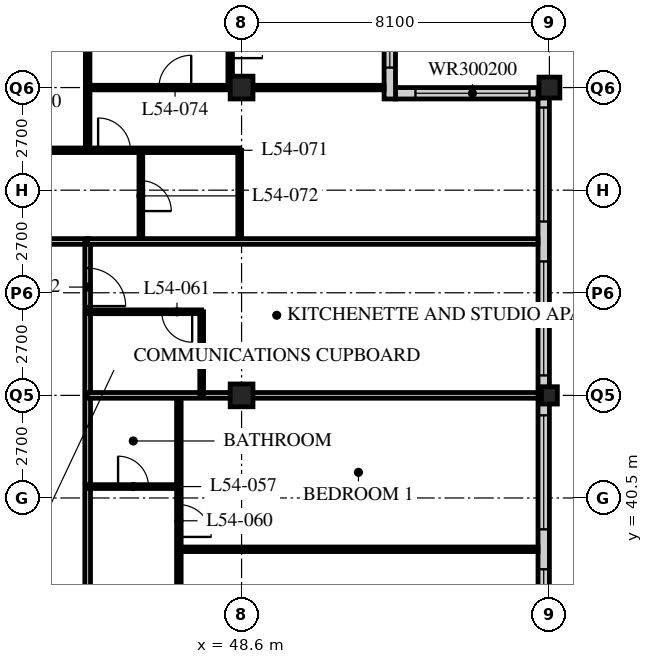
"""IFC4 building model, lengths in metres.
Left out: names, types, materials, properties, quantities, classifications, styles, units other than length and angle.
Written with IfcOpenShell. Run it as: python <this file> out.ifc"""

import sys

from ifc_helpers import new_model, si_unit, direction, frame, frame_2d, origin, origin_2d, place, context, subcontext, project, spatial, rectangle, hollow_rectangle, i_section, extrude, element, fill, save


model = new_model("IFC4")
c1 = context("Model", 3, precision=1e-05, world=origin(), true_north=direction((0.0, 1.0)))
c2 = subcontext(c1, "Body", "Model", "MODEL_VIEW")
j1 = project(units=[si_unit("LENGTHUNIT", "METRE"), si_unit("PLANEANGLEUNIT", "RADIAN")], contexts=[c1])
p1 = place(None, origin())
s1 = spatial("IfcSite", under=j1, at=p1, CompositionType="ELEMENT")
p2 = place(p1, origin())
s2 = spatial("IfcBuilding", under=s1, at=p2, CompositionType="ELEMENT")
p3 = place(p2, frame((0.0, 0.0, 210.0)))
s3 = spatial("IfcBuildingStorey", under=s2, at=p3, CompositionType="ELEMENT", Elevation=210.0)
for number, where, z_axis, x_axis in (
    (1, (48.6, 43.2, 0.0), (0.0, 0.0, 1.0), (1.0, 0.0, 0.0)),
    (2, (48.6, 51.3, 0.0), (0.0, 0.0, 1.0), (1.0, 0.0, 0.0)),
):
    element("IfcColumn", number, at=place(p3, frame(where, z_axis=z_axis, x_axis=x_axis)), inside=s3, PredefinedType="COLUMN", context=c2, shape_type="SweptSolid", body=[
        extrude(hollow_rectangle(XDim=0.6, YDim=0.6, WallThickness=0.05, at=origin_2d()), origin(), (0.0, 0.0, 1.0), 3.6),
    ])
p4 = place(p3, frame((56.7, 43.2, 0.0), z_axis=(0.0, 0.0, 1.0), x_axis=(1.0, 0.0, 0.0)))
e3 = element("IfcColumn", 3, at=p4, inside=s3, PredefinedType="COLUMN", context=c2, shape_type="SweptSolid", body=[
    extrude(i_section(OverallWidth=0.418, OverallDepth=0.456, WebThickness=0.042, FlangeThickness=0.067, FilletRadius=0.015, at=origin_2d()), origin(), (0.0, 0.0, 1.0), 3.6),
])
p5 = place(p3, frame((56.7, 51.3, 0.0), z_axis=(0.0, 0.0, 1.0), x_axis=(1.0, 0.0, 0.0)))
e4 = element("IfcColumn", 4, at=p5, inside=s3, PredefinedType="COLUMN", context=c2, shape_type="SweptSolid", body=[
    extrude(hollow_rectangle(XDim=0.55, YDim=0.55, WallThickness=0.045, at=origin_2d()), origin(), (0.0, 0.0, 1.0), 3.6),
])
p6 = place(p3, frame((56.55, 19.2, 0.0), z_axis=(0.0, 0.0, 1.0), x_axis=(0.0, 1.0, 0.0)))
e5 = element("IfcWall", 5, at=p6, inside=s3, PredefinedType="SOLIDWALL", context=c2, shape_type="SweptSolid", body=[
    extrude(rectangle(XDim=32.1, YDim=0.3, at=frame_2d((16.05, 0.0))), origin(), (0.0, 0.0, 1.0), 3.39),
])
p7 = place(p6, frame((0.225, 0.0, 0.6)))
e6 = element("IfcOpeningElement", 6, at=p7, cuts=e5, PredefinedType="OPENING", context=c2, shape_type="SweptSolid", body=[
    extrude(rectangle(XDim=3.0, YDim=2.4, at=frame_2d((1.5, 1.2))), frame((0.0, 0.16, 0.0), z_axis=(0.0, -1.0, 0.0), x_axis=(1.0, 0.0, 0.0)), (0.0, 0.0, 1.0), 0.32),
])
p8 = place(p6, frame((4.275, 0.0, 0.6)))
e7 = element("IfcOpeningElement", 7, at=p8, cuts=e5, PredefinedType="OPENING", context=c2, shape_type="SweptSolid", body=[
    extrude(rectangle(XDim=3.0, YDim=2.4, at=frame_2d((1.5, 1.2))), frame((0.0, 0.16, 0.0), z_axis=(0.0, -1.0, 0.0), x_axis=(1.0, 0.0, 0.0)), (0.0, 0.0, 1.0), 0.32),
])
p9 = place(p6, frame((8.325, 0.0, 0.6)))
e8 = element("IfcOpeningElement", 8, at=p9, cuts=e5, PredefinedType="OPENING", context=c2, shape_type="SweptSolid", body=[
    extrude(rectangle(XDim=3.0, YDim=2.4, at=frame_2d((1.5, 1.2))), frame((0.0, 0.16, 0.0), z_axis=(0.0, -1.0, 0.0), x_axis=(1.0, 0.0, 0.0)), (0.0, 0.0, 1.0), 0.32),
])
p10 = place(p6, frame((12.375, 0.0, 0.6)))
e9 = element("IfcOpeningElement", 9, at=p10, cuts=e5, PredefinedType="OPENING", context=c2, shape_type="SweptSolid", body=[
    extrude(rectangle(XDim=3.0, YDim=2.4, at=frame_2d((1.5, 1.2))), frame((0.0, 0.16, 0.0), z_axis=(0.0, -1.0, 0.0), x_axis=(1.0, 0.0, 0.0)), (0.0, 0.0, 1.0), 0.32),
])
p11 = place(p6, frame((16.425, 0.0, 0.6)))
e10 = element("IfcOpeningElement", 10, at=p11, cuts=e5, PredefinedType="OPENING", context=c2, shape_type="SweptSolid", body=[
    extrude(rectangle(XDim=3.0, YDim=2.4, at=frame_2d((1.5, 1.2))), frame((0.0, 0.16, 0.0), z_axis=(0.0, -1.0, 0.0), x_axis=(1.0, 0.0, 0.0)), (0.0, 0.0, 1.0), 0.32),
])
p12 = place(p6, frame((20.475, 0.0, 0.6)))
e11 = element("IfcOpeningElement", 11, at=p12, cuts=e5, PredefinedType="OPENING", context=c2, shape_type="SweptSolid", body=[
    extrude(rectangle(XDim=3.0, YDim=2.4, at=frame_2d((1.5, 1.2))), frame((0.0, 0.16, 0.0), z_axis=(0.0, -1.0, 0.0), x_axis=(1.0, 0.0, 0.0)), (0.0, 0.0, 1.0), 0.32),
])
p13 = place(p6, frame((24.525, 0.0, 0.6)))
e12 = element("IfcOpeningElement", 12, at=p13, cuts=e5, PredefinedType="OPENING", context=c2, shape_type="SweptSolid", body=[
    extrude(rectangle(XDim=3.0, YDim=2.4, at=frame_2d((1.5, 1.2))), frame((0.0, 0.16, 0.0), z_axis=(0.0, -1.0, 0.0), x_axis=(1.0, 0.0, 0.0)), (0.0, 0.0, 1.0), 0.32),
])
p14 = place(p6, frame((28.575, 0.0, 0.6)))
e13 = element("IfcOpeningElement", 13, at=p14, cuts=e5, PredefinedType="OPENING", context=c2, shape_type="SweptSolid", body=[
    extrude(rectangle(XDim=3.0, YDim=2.4, at=frame_2d((1.5, 1.2))), frame((0.0, 0.16, 0.0), z_axis=(0.0, -1.0, 0.0), x_axis=(1.0, 0.0, 0.0)), (0.0, 0.0, 1.0), 0.32),
])
p15 = place(p3, frame((56.4, 51.15, 0.0), z_axis=(0.0, 0.0, 1.0), x_axis=(-1.0, 0.0, 0.0)))
e14 = element("IfcWall", 14, at=p15, inside=s3, PredefinedType="SOLIDWALL", context=c2, shape_type="SweptSolid", body=[
    extrude(rectangle(XDim=3.75, YDim=0.3, at=frame_2d((1.875, 0.0))), origin(), (0.0, 0.0, 1.0), 3.39),
])
p16 = place(p15, frame((0.225, 0.0, 0.6)))
e15 = element("IfcOpeningElement", 15, at=p16, cuts=e14, PredefinedType="OPENING", context=c2, shape_type="SweptSolid", body=[
    extrude(rectangle(XDim=3.0, YDim=2.0, at=frame_2d((1.5, 1.0))), frame((0.0, 0.16, 0.0), z_axis=(0.0, -1.0, 0.0), x_axis=(1.0, 0.0, 0.0)), (0.0, 0.0, 1.0), 0.32),
])
p17 = place(p3, frame((52.5, 51.0, 0.0), z_axis=(0.0, 0.0, 1.0), x_axis=(0.0, 1.0, 0.0)))
e16 = element("IfcWall", 16, at=p17, inside=s3, PredefinedType="SOLIDWALL", context=c2, shape_type="SweptSolid", body=[
    extrude(rectangle(XDim=4.35, YDim=0.3, at=frame_2d((2.175, 0.0))), origin(), (0.0, 0.0, 1.0), 3.39),
])
p18 = place(p17, frame((0.825, 0.0, 0.6)))
e17 = element("IfcOpeningElement", 17, at=p18, cuts=e16, PredefinedType="OPENING", context=c2, shape_type="SweptSolid", body=[
    extrude(rectangle(XDim=3.0, YDim=2.0, at=frame_2d((1.5, 1.0))), frame((0.0, 0.16, 0.0), z_axis=(0.0, -1.0, 0.0), x_axis=(1.0, 0.0, 0.0)), (0.0, 0.0, 1.0), 0.32),
])
p19 = place(p3, frame((8.1, 47.25, 0.0), z_axis=(0.0, 0.0, 1.0), x_axis=(1.0, 0.0, 0.0)))
e18 = element("IfcWall", 18, at=p19, inside=s3, PredefinedType="PARTITIONING", context=c2, shape_type="SweptSolid", body=[
    extrude(rectangle(XDim=36.45, YDim=0.15, at=frame_2d((18.225, 0.0))), origin(), (0.0, 0.0, 1.0), 3.39),
])
p20 = place(p19, frame((4.45, 0.0, 0.0)))
e19 = element("IfcOpeningElement", 19, at=p20, cuts=e18, PredefinedType="OPENING", context=c2, shape_type="SweptSolid", body=[
    extrude(rectangle(XDim=1.0, YDim=2.1, at=frame_2d((0.5, 1.05))), frame((0.0, 0.085, 0.0), z_axis=(0.0, -1.0, 0.0), x_axis=(1.0, 0.0, 0.0)), (0.0, 0.0, 1.0), 0.17),
])
p21 = place(p19, frame((12.55, 0.0, 0.0)))
e20 = element("IfcOpeningElement", 20, at=p21, cuts=e18, PredefinedType="OPENING", context=c2, shape_type="SweptSolid", body=[
    extrude(rectangle(XDim=1.0, YDim=2.1, at=frame_2d((0.5, 1.05))), frame((0.0, 0.085, 0.0), z_axis=(0.0, -1.0, 0.0), x_axis=(1.0, 0.0, 0.0)), (0.0, 0.0, 1.0), 0.17),
])
p22 = place(p19, frame((30.7, 0.0, 0.0)))
e21 = element("IfcOpeningElement", 21, at=p22, cuts=e18, PredefinedType="OPENING", context=c2, shape_type="SweptSolid", body=[
    extrude(rectangle(XDim=1.0, YDim=2.1, at=frame_2d((0.5, 1.05))), frame((0.0, 0.085, 0.0), z_axis=(0.0, -1.0, 0.0), x_axis=(1.0, 0.0, 0.0)), (0.0, 0.0, 1.0), 0.17),
])
p23 = place(p19, frame((33.925, 0.0, 0.0)))
e22 = element("IfcOpeningElement", 22, at=p23, cuts=e18, PredefinedType="OPENING", context=c2, shape_type="SweptSolid", body=[
    extrude(rectangle(XDim=1.0, YDim=2.1, at=frame_2d((0.5, 1.05))), frame((0.0, 0.085, 0.0), z_axis=(0.0, -1.0, 0.0), x_axis=(1.0, 0.0, 0.0)), (0.0, 0.0, 1.0), 0.17),
])
p24 = place(p19, frame((1.525, 0.0, 0.0)))
e23 = element("IfcOpeningElement", 23, at=p24, cuts=e18, PredefinedType="OPENING", context=c2, shape_type="SweptSolid", body=[
    extrude(rectangle(XDim=1.0, YDim=2.1, at=frame_2d((0.5, 1.05))), frame((0.0, 0.085, 0.0), z_axis=(0.0, -1.0, 0.0), x_axis=(1.0, 0.0, 0.0)), (0.0, 0.0, 1.0), 0.17),
])
p25 = place(p3, frame((44.55, 18.9, 0.0), z_axis=(0.0, 0.0, 1.0), x_axis=(0.0, 1.0, 0.0)))
e24 = element("IfcWall", 24, at=p25, inside=s3, PredefinedType="PARTITIONING", context=c2, shape_type="SweptSolid", body=[
    extrude(rectangle(XDim=28.35, YDim=0.15, at=frame_2d((14.175, 0.0))), origin(), (0.0, 0.0, 1.0), 3.39),
])
p26 = place(p25, frame((0.4, 0.0, 0.0)))
e25 = element("IfcOpeningElement", 25, at=p26, cuts=e24, PredefinedType="OPENING", context=c2, shape_type="SweptSolid", body=[
    extrude(rectangle(XDim=1.0, YDim=2.1, at=frame_2d((0.5, 1.05))), frame((0.0, 0.085, 0.0), z_axis=(0.0, -1.0, 0.0), x_axis=(1.0, 0.0, 0.0)), (0.0, 0.0, 1.0), 0.17),
])
p27 = place(p25, frame((12.55, 0.0, 0.0)))
e26 = element("IfcOpeningElement", 26, at=p27, cuts=e24, PredefinedType="OPENING", context=c2, shape_type="SweptSolid", body=[
    extrude(rectangle(XDim=1.0, YDim=2.1, at=frame_2d((0.5, 1.05))), frame((0.0, 0.085, 0.0), z_axis=(0.0, -1.0, 0.0), x_axis=(1.0, 0.0, 0.0)), (0.0, 0.0, 1.0), 0.17),
])
p28 = place(p25, frame((26.65, 0.0, 0.0)))
e27 = element("IfcOpeningElement", 27, at=p28, cuts=e24, PredefinedType="OPENING", context=c2, shape_type="SweptSolid", body=[
    extrude(rectangle(XDim=1.0, YDim=2.1, at=frame_2d((0.5, 1.05))), frame((0.0, 0.085, 0.0), z_axis=(0.0, -1.0, 0.0), x_axis=(1.0, 0.0, 0.0)), (0.0, 0.0, 1.0), 0.17),
])
p29 = place(p3, frame((46.95, 18.9, 0.0), z_axis=(0.0, 0.0, 1.0), x_axis=(0.0, 1.0, 0.0)))
e28 = element("IfcWall", 28, at=p29, inside=s3, PredefinedType="PARTITIONING", context=c2, shape_type="SweptSolid", body=[
    extrude(rectangle(XDim=24.3, YDim=0.12, at=frame_2d((12.15, 0.0))), origin(), (0.0, 0.0, 1.0), 3.39),
])
p30 = place(p29, frame((0.975, 0.0, 0.0)))
e29 = element("IfcOpeningElement", 29, at=p30, cuts=e28, PredefinedType="OPENING", context=c2, shape_type="SweptSolid", body=[
    extrude(rectangle(XDim=0.85, YDim=2.1, at=frame_2d((0.425, 1.05))), frame((0.0, 0.07, 0.0), z_axis=(0.0, -1.0, 0.0), x_axis=(1.0, 0.0, 0.0)), (0.0, 0.0, 1.0), 0.14),
])
p31 = place(p29, frame((8.425, 0.0, 0.0)))
e30 = element("IfcOpeningElement", 30, at=p31, cuts=e28, PredefinedType="OPENING", context=c2, shape_type="SweptSolid", body=[
    extrude(rectangle(XDim=0.85, YDim=2.1, at=frame_2d((0.425, 1.05))), frame((0.0, 0.07, 0.0), z_axis=(0.0, -1.0, 0.0), x_axis=(1.0, 0.0, 0.0)), (0.0, 0.0, 1.0), 0.14),
])
p32 = place(p29, frame((13.125, 0.0, 0.0)))
e31 = element("IfcOpeningElement", 31, at=p32, cuts=e28, PredefinedType="OPENING", context=c2, shape_type="SweptSolid", body=[
    extrude(rectangle(XDim=0.85, YDim=2.1, at=frame_2d((0.425, 1.05))), frame((0.0, 0.07, 0.0), z_axis=(0.0, -1.0, 0.0), x_axis=(1.0, 0.0, 0.0)), (0.0, 0.0, 1.0), 0.14),
])
p33 = place(p29, frame((20.575, 0.0, 0.0)))
e32 = element("IfcOpeningElement", 32, at=p33, cuts=e28, PredefinedType="OPENING", context=c2, shape_type="SweptSolid", body=[
    extrude(rectangle(XDim=0.85, YDim=2.1, at=frame_2d((0.425, 1.05))), frame((0.0, 0.07, 0.0), z_axis=(0.0, -1.0, 0.0), x_axis=(1.0, 0.0, 0.0)), (0.0, 0.0, 1.0), 0.14),
])
p34 = place(p3, frame((44.55, 40.8, 0.0), z_axis=(0.0, 0.0, 1.0), x_axis=(1.0, 0.0, 0.0)))
e33 = element("IfcWall", 33, at=p34, inside=s3, PredefinedType="PARTITIONING", context=c2, shape_type="SweptSolid", body=[
    extrude(rectangle(XDim=2.4, YDim=0.1, at=frame_2d((1.2, 0.0))), origin(), (0.0, 0.0, 1.0), 3.39),
])
p35 = place(p34, frame((0.8, 0.0, 0.0)))
e34 = element("IfcOpeningElement", 34, at=p35, cuts=e33, PredefinedType="OPENING", context=c2, shape_type="SweptSolid", body=[
    extrude(rectangle(XDim=0.8, YDim=2.1, at=frame_2d((0.4, 1.05))), frame((0.0, 0.06, 0.0), z_axis=(0.0, -1.0, 0.0), x_axis=(1.0, 0.0, 0.0)), (0.0, 0.0, 1.0), 0.12),
])
p36 = place(p3, frame((46.95, 39.15, 0.0), z_axis=(0.0, 0.0, 1.0), x_axis=(1.0, 0.0, 0.0)))
e35 = element("IfcWall", 35, at=p36, inside=s3, PredefinedType="PARTITIONING", context=c2, shape_type="SweptSolid", body=[
    extrude(rectangle(XDim=9.45, YDim=0.12, at=frame_2d((4.725, 0.0))), origin(), (0.0, 0.0, 1.0), 3.39),
])
p37 = place(p3, frame((44.55, 43.2, 0.0), z_axis=(0.0, 0.0, 1.0), x_axis=(1.0, 0.0, 0.0)))
e36 = element("IfcWall", 36, at=p37, inside=s3, PredefinedType="PARTITIONING", context=c2, shape_type="SweptSolid", body=[
    extrude(rectangle(XDim=11.85, YDim=0.15, at=frame_2d((5.925, 0.0))), origin(), (0.0, 0.0, 1.0), 2.778),
])
p38 = place(p3, frame((47.55, 43.2, 0.0), z_axis=(0.0, 0.0, 1.0), x_axis=(0.0, 1.0, 0.0)))
e37 = element("IfcWall", 37, at=p38, inside=s3, PredefinedType="PARTITIONING", context=c2, shape_type="SweptSolid", body=[
    extrude(rectangle(XDim=2.2, YDim=0.1, at=frame_2d((1.1, 0.0))), origin(), (0.0, 0.0, 1.0), 3.39),
])
p39 = place(p3, frame((44.55, 45.4, 0.0), z_axis=(0.0, 0.0, 1.0), x_axis=(1.0, 0.0, 0.0)))
e38 = element("IfcWall", 38, at=p39, inside=s3, PredefinedType="PARTITIONING", context=c2, shape_type="SweptSolid", body=[
    extrude(rectangle(XDim=3.0, YDim=0.1, at=frame_2d((1.5, 0.0))), origin(), (0.0, 0.0, 1.0), 3.39),
])
p40 = place(p39, frame((1.95, 0.0, 0.0)))
e39 = element("IfcOpeningElement", 39, at=p40, cuts=e38, PredefinedType="OPENING", context=c2, shape_type="SweptSolid", body=[
    extrude(rectangle(XDim=0.8, YDim=2.1, at=frame_2d((0.4, 1.05))), frame((0.0, 0.06, 0.0), z_axis=(0.0, -1.0, 0.0), x_axis=(1.0, 0.0, 0.0)), (0.0, 0.0, 1.0), 0.12),
])
p41 = place(p3, frame((40.5, 49.65, 0.0), z_axis=(0.0, 0.0, 1.0), x_axis=(1.0, 0.0, 0.0)))
e40 = element("IfcWall", 40, at=p41, inside=s3, PredefinedType="PARTITIONING", context=c2, shape_type="SweptSolid", body=[
    extrude(rectangle(XDim=8.05, YDim=0.12, at=frame_2d((4.025, 0.0))), origin(), (0.0, 0.0, 1.0), 3.39),
])
p42 = place(p41, frame((0.475, 0.0, 0.0)))
e41 = element("IfcOpeningElement", 41, at=p42, cuts=e40, PredefinedType="OPENING", context=c2, shape_type="SweptSolid", body=[
    extrude(rectangle(XDim=0.85, YDim=2.1, at=frame_2d((0.425, 1.05))), frame((0.0, 0.07, 0.0), z_axis=(0.0, -1.0, 0.0), x_axis=(1.0, 0.0, 0.0)), (0.0, 0.0, 1.0), 0.14),
])
p43 = place(p41, frame((4.325, 0.0, 0.0)))
e42 = element("IfcOpeningElement", 42, at=p43, cuts=e40, PredefinedType="OPENING", context=c2, shape_type="SweptSolid", body=[
    extrude(rectangle(XDim=0.85, YDim=2.1, at=frame_2d((0.425, 1.05))), frame((0.0, 0.07, 0.0), z_axis=(0.0, -1.0, 0.0), x_axis=(1.0, 0.0, 0.0)), (0.0, 0.0, 1.0), 0.14),
])
p44 = place(p3, frame((45.95, 47.25, 0.0), z_axis=(0.0, 0.0, 1.0), x_axis=(0.0, 1.0, 0.0)))
e43 = element("IfcWall", 43, at=p44, inside=s3, PredefinedType="PARTITIONING", context=c2, shape_type="SweptSolid", body=[
    extrude(rectangle(XDim=2.4, YDim=0.1, at=frame_2d((1.2, 0.0))), origin(), (0.0, 0.0, 1.0), 3.39),
])
p45 = place(p44, frame((0.8, 0.0, 0.0)))
e44 = element("IfcOpeningElement", 44, at=p45, cuts=e43, PredefinedType="OPENING", context=c2, shape_type="SweptSolid", body=[
    extrude(rectangle(XDim=0.8, YDim=2.1, at=frame_2d((0.4, 1.05))), frame((0.0, 0.06, 0.0), z_axis=(0.0, -1.0, 0.0), x_axis=(1.0, 0.0, 0.0)), (0.0, 0.0, 1.0), 0.12),
])
p46 = place(p3, frame((48.55, 47.25, 0.0), z_axis=(0.0, 0.0, 1.0), x_axis=(0.0, 1.0, 0.0)))
e45 = element("IfcWall", 45, at=p46, inside=s3, PredefinedType="PARTITIONING", context=c2, shape_type="SweptSolid", body=[
    extrude(rectangle(XDim=2.4, YDim=0.1, at=frame_2d((1.2, 0.0))), origin(), (0.0, 0.0, 1.0), 2.778),
])
p47 = place(p3, frame((44.55, 49.65, 0.0), z_axis=(0.0, 0.0, 1.0), x_axis=(0.0, 1.0, 0.0)))
e46 = element("IfcWall", 46, at=p47, inside=s3, PredefinedType="PARTITIONING", context=c2, shape_type="SweptSolid", body=[
    extrude(rectangle(XDim=9.45, YDim=0.12, at=frame_2d((4.725, 0.0))), origin(), (0.0, 0.0, 1.0), 3.39),
])
p48 = place(p3, frame((44.55, 51.3, 0.0), z_axis=(0.0, 0.0, 1.0), x_axis=(1.0, 0.0, 0.0)))
e47 = element("IfcWall", 47, at=p48, inside=s3, PredefinedType="PARTITIONING", context=c2, shape_type="SweptSolid", body=[
    extrude(rectangle(XDim=7.8, YDim=0.12, at=frame_2d((3.9, 0.0))), origin(), (0.0, 0.0, 1.0), 2.778),
])
p49 = place(p48, frame((1.875, 0.0, 0.0)))
e48 = element("IfcOpeningElement", 48, at=p49, cuts=e47, PredefinedType="OPENING", context=c2, shape_type="SweptSolid", body=[
    extrude(rectangle(XDim=0.85, YDim=2.1, at=frame_2d((0.425, 1.05))), frame((0.0, 0.07, 0.0), z_axis=(0.0, -1.0, 0.0), x_axis=(1.0, 0.0, 0.0)), (0.0, 0.0, 1.0), 0.14),
])
p50 = place(p3, frame((44.55, 47.25, 0.0), z_axis=(0.0, 0.0, 1.0), x_axis=(1.0, 0.0, 0.0)))
e49 = element("IfcWall", 49, at=p50, inside=s3, PredefinedType="PARTITIONING", context=c2, shape_type="SweptSolid", body=[
    extrude(rectangle(XDim=11.85, YDim=0.15, at=frame_2d((5.925, 0.0))), origin(), (0.0, 0.0, 1.0), 3.39),
])
p51 = place(p3, frame((48.3, 51.3, 0.0), z_axis=(0.0, 0.0, 1.0), x_axis=(0.0, 1.0, 0.0)))
e50 = element("IfcWall", 50, at=p51, inside=s3, PredefinedType="PARTITIONING", context=c2, shape_type="SweptSolid", body=[
    extrude(rectangle(XDim=3.75, YDim=0.12, at=frame_2d((1.875, 0.0))), origin(), (0.0, 0.0, 1.0), 3.39),
])
p52 = place(p51, frame((0.775, 0.0, 0.0)))
e51 = element("IfcOpeningElement", 51, at=p52, cuts=e50, PredefinedType="OPENING", context=c2, shape_type="SweptSolid", body=[
    extrude(rectangle(XDim=0.85, YDim=2.1, at=frame_2d((0.425, 1.05))), frame((0.0, 0.07, 0.0), z_axis=(0.0, -1.0, 0.0), x_axis=(1.0, 0.0, 0.0)), (0.0, 0.0, 1.0), 0.14),
])
p53 = place(p11, origin())
e52 = element("IfcWindow", 52, at=p53, inside=s3, PartitioningType="SINGLE_PANEL", PredefinedType="WINDOW", context=c2, shape_type="SweptSolid", body=[
    extrude(rectangle(XDim=3.0, YDim=2.4, at=frame_2d((1.5, 1.2))), frame((0.0, 0.03, 0.0), z_axis=(0.0, -1.0, 0.0), x_axis=(1.0, 0.0, 0.0)), (0.0, 0.0, 1.0), 0.06),
])
fill(e10, e52)
p54 = place(p12, origin())
e53 = element("IfcWindow", 53, at=p54, inside=s3, PartitioningType="SINGLE_PANEL", PredefinedType="WINDOW", context=c2, shape_type="SweptSolid", body=[
    extrude(rectangle(XDim=3.0, YDim=2.4, at=frame_2d((1.5, 1.2))), frame((0.0, 0.03, 0.0), z_axis=(0.0, -1.0, 0.0), x_axis=(1.0, 0.0, 0.0)), (0.0, 0.0, 1.0), 0.06),
])
fill(e11, e53)
p55 = place(p13, origin())
e54 = element("IfcWindow", 54, at=p55, inside=s3, PartitioningType="SINGLE_PANEL", PredefinedType="WINDOW", context=c2, shape_type="SweptSolid", body=[
    extrude(rectangle(XDim=3.0, YDim=2.4, at=frame_2d((1.5, 1.2))), frame((0.0, 0.03, 0.0), z_axis=(0.0, -1.0, 0.0), x_axis=(1.0, 0.0, 0.0)), (0.0, 0.0, 1.0), 0.06),
])
fill(e12, e54)
p56 = place(p14, origin())
e55 = element("IfcWindow", 55, at=p56, inside=s3, PartitioningType="SINGLE_PANEL", PredefinedType="WINDOW", context=c2, shape_type="SweptSolid", body=[
    extrude(rectangle(XDim=3.0, YDim=2.4, at=frame_2d((1.5, 1.2))), frame((0.0, 0.03, 0.0), z_axis=(0.0, -1.0, 0.0), x_axis=(1.0, 0.0, 0.0)), (0.0, 0.0, 1.0), 0.06),
])
fill(e13, e55)
p57 = place(p16, origin())
e56 = element("IfcWindow", 56, at=p57, inside=s3, PartitioningType="SINGLE_PANEL", PredefinedType="WINDOW", context=c2, shape_type="SweptSolid", body=[
    extrude(rectangle(XDim=3.0, YDim=2.0, at=frame_2d((1.5, 1.0))), frame((0.0, 0.03, 0.0), z_axis=(0.0, -1.0, 0.0), x_axis=(1.0, 0.0, 0.0)), (0.0, 0.0, 1.0), 0.06),
])
fill(e15, e56)
p58 = place(p18, origin())
e57 = element("IfcWindow", 57, at=p58, inside=s3, PartitioningType="SINGLE_PANEL", PredefinedType="WINDOW", context=c2, shape_type="SweptSolid", body=[
    extrude(rectangle(XDim=3.0, YDim=2.0, at=frame_2d((1.5, 1.0))), frame((0.0, 0.03, 0.0), z_axis=(0.0, -1.0, 0.0), x_axis=(1.0, 0.0, 0.0)), (0.0, 0.0, 1.0), 0.06),
])
fill(e17, e57)
p59 = place(p35, origin())
e58 = element("IfcDoor", 58, at=p59, inside=s3, OperationType="SINGLE_SWING_LEFT", PredefinedType="DOOR", context=c2, shape_type="SweptSolid", body=[
    extrude(rectangle(XDim=0.8, YDim=2.1, at=frame_2d((0.4, 1.05))), frame((0.0, 0.025, 0.0), z_axis=(0.0, -1.0, 0.0), x_axis=(1.0, 0.0, 0.0)), (0.0, 0.0, 1.0), 0.05),
])
fill(e34, e58)
p60 = place(p33, origin())
e59 = element("IfcDoor", 59, at=p60, inside=s3, OperationType="SINGLE_SWING_RIGHT", PredefinedType="DOOR", context=c2, shape_type="SweptSolid", body=[
    extrude(rectangle(XDim=0.85, YDim=2.1, at=frame_2d((0.425, 1.05))), frame((0.0, 0.025, 0.0), z_axis=(0.0, -1.0, 0.0), x_axis=(1.0, 0.0, 0.0)), (0.0, 0.0, 1.0), 0.05),
])
fill(e32, e59)
p61 = place(p40, origin())
e60 = element("IfcDoor", 60, at=p61, inside=s3, OperationType="SINGLE_SWING_LEFT", PredefinedType="DOOR", context=c2, shape_type="SweptSolid", body=[
    extrude(rectangle(XDim=0.8, YDim=2.1, at=frame_2d((0.4, 1.05))), frame((0.0, 0.025, 0.0), z_axis=(0.0, -1.0, 0.0), x_axis=(1.0, 0.0, 0.0)), (0.0, 0.0, 1.0), 0.05),
])
fill(e39, e60)
p62 = place(p28, origin())
e61 = element("IfcDoor", 61, at=p62, inside=s3, OperationType="SINGLE_SWING_RIGHT", PredefinedType="DOOR", context=c2, shape_type="SweptSolid", body=[
    extrude(rectangle(XDim=1.0, YDim=2.1, at=frame_2d((0.5, 1.05))), frame((0.0, 0.025, 0.0), z_axis=(0.0, -1.0, 0.0), x_axis=(1.0, 0.0, 0.0)), (0.0, 0.0, 1.0), 0.05),
])
fill(e27, e61)
p63 = place(p45, origin())
e62 = element("IfcDoor", 62, at=p63, inside=s3, OperationType="SINGLE_SWING_RIGHT", PredefinedType="DOOR", context=c2, shape_type="SweptSolid", body=[
    extrude(rectangle(XDim=0.8, YDim=2.1, at=frame_2d((0.4, 1.05))), frame((0.0, 0.025, 0.0), z_axis=(0.0, -1.0, 0.0), x_axis=(1.0, 0.0, 0.0)), (0.0, 0.0, 1.0), 0.05),
])
fill(e44, e62)
p64 = place(p43, origin())
e63 = element("IfcDoor", 63, at=p64, inside=s3, OperationType="SINGLE_SWING_LEFT", PredefinedType="DOOR", context=c2, shape_type="SweptSolid", body=[
    extrude(rectangle(XDim=0.85, YDim=2.1, at=frame_2d((0.425, 1.05))), frame((0.0, 0.025, 0.0), z_axis=(0.0, -1.0, 0.0), x_axis=(1.0, 0.0, 0.0)), (0.0, 0.0, 1.0), 0.05),
])
fill(e42, e63)
p65 = place(p49, origin())
e64 = element("IfcDoor", 64, at=p65, inside=s3, OperationType="SINGLE_SWING_RIGHT", PredefinedType="DOOR", context=c2, shape_type="SweptSolid", body=[
    extrude(rectangle(XDim=0.85, YDim=2.1, at=frame_2d((0.425, 1.05))), frame((0.0, 0.025, 0.0), z_axis=(0.0, -1.0, 0.0), x_axis=(1.0, 0.0, 0.0)), (0.0, 0.0, 1.0), 0.05),
])
fill(e48, e64)
p66 = place(p52, origin())
e65 = element("IfcDoor", 65, at=p66, inside=s3, OperationType="SINGLE_SWING_RIGHT", PredefinedType="DOOR", context=c2, shape_type="SweptSolid", body=[
    extrude(rectangle(XDim=0.85, YDim=2.1, at=frame_2d((0.425, 1.05))), frame((0.0, 0.025, 0.0), z_axis=(0.0, -1.0, 0.0), x_axis=(1.0, 0.0, 0.0)), (0.0, 0.0, 1.0), 0.05),
])
fill(e51, e65)
save(model, sys.argv[1])
